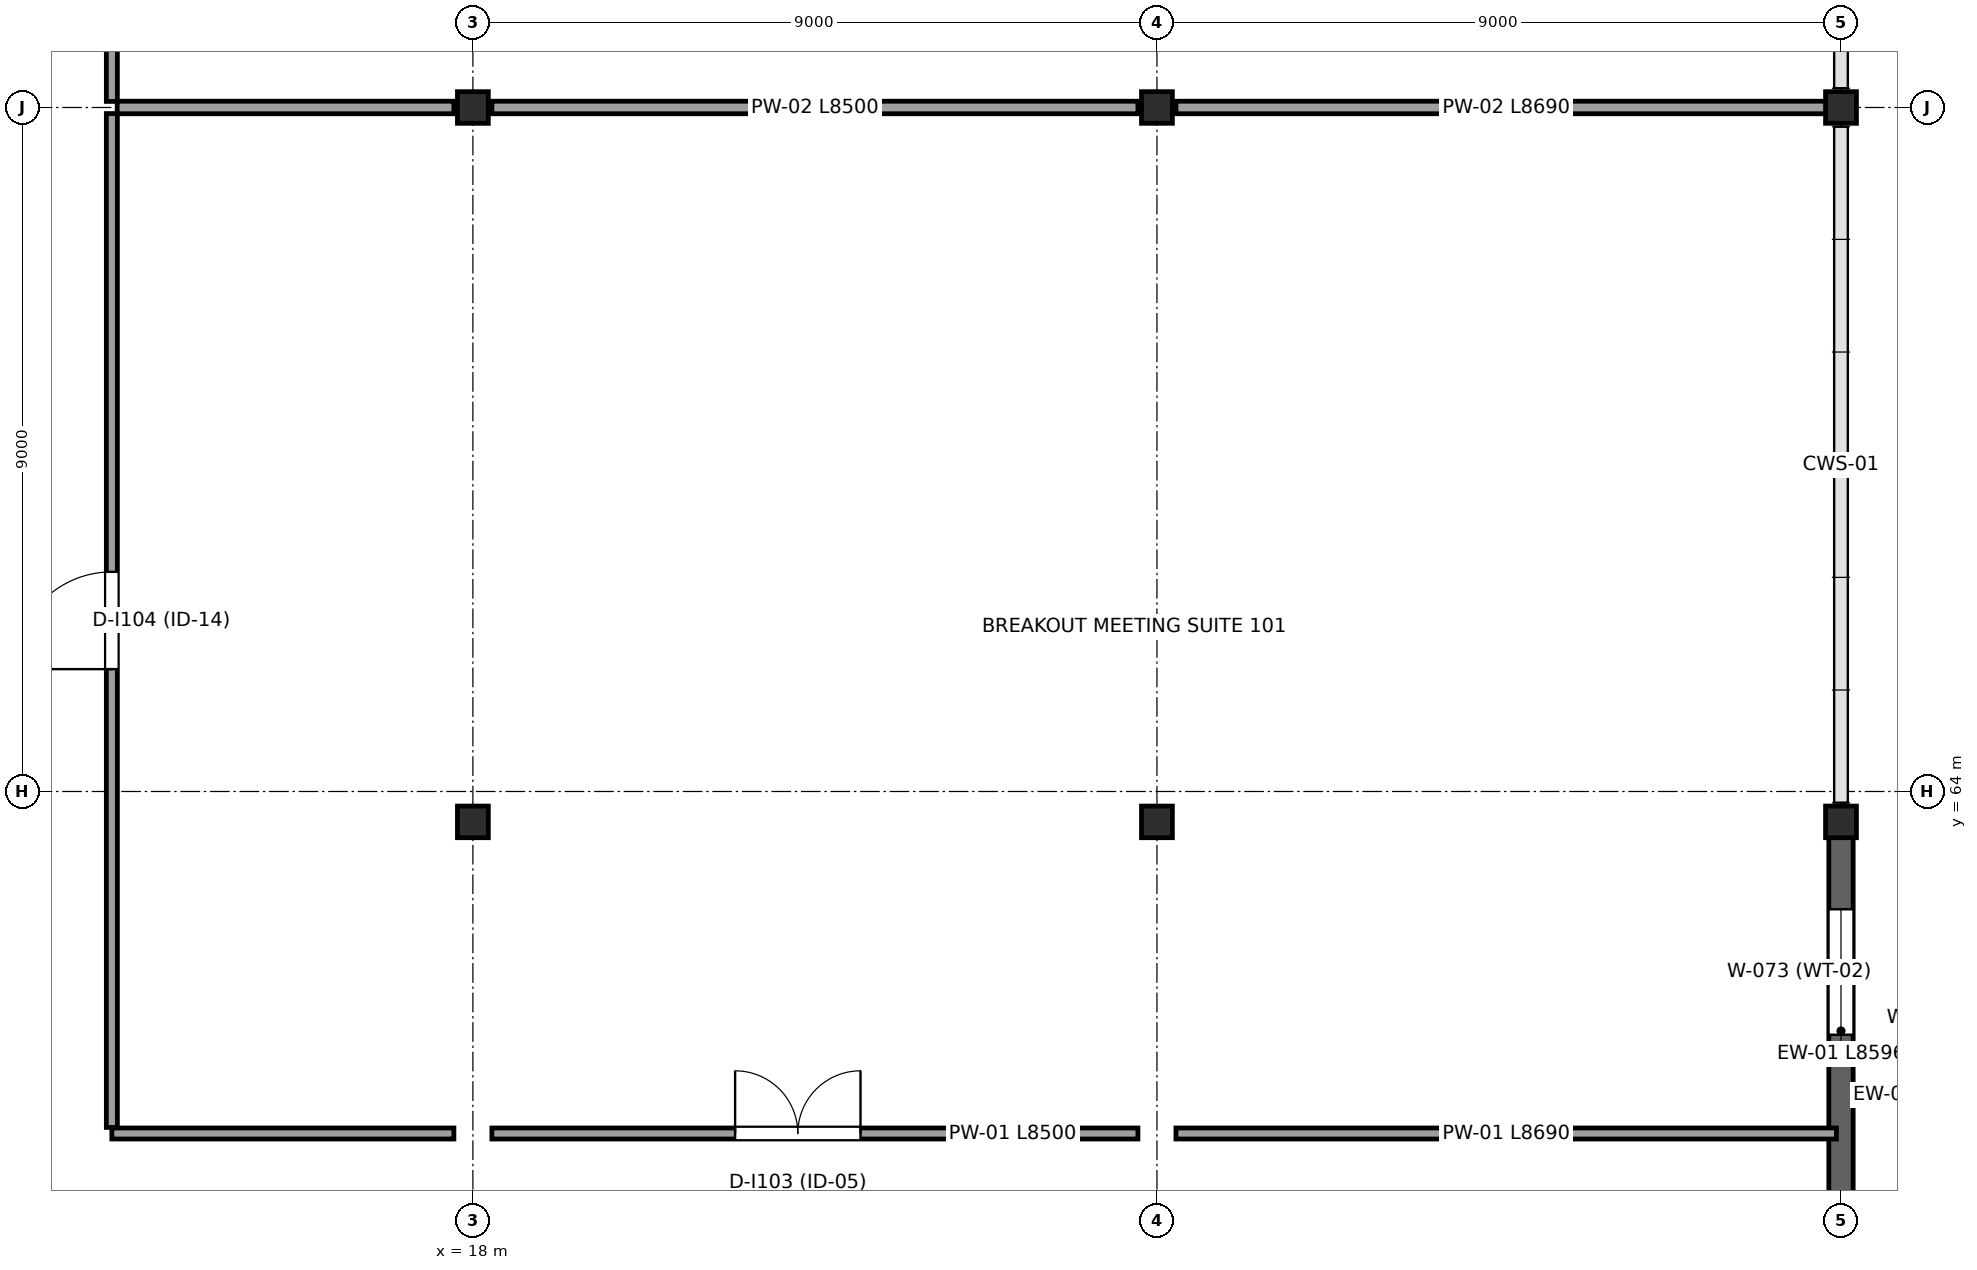
"""IFC4 building model, lengths in metres.
Left out: names, types, materials, properties, quantities, classifications, styles, units other than length and angle.
Written with IfcOpenShell. Run it as: python <this file> out.ifc"""

import sys

from ifc_helpers import new_model, si_unit, direction, frame, frame_2d, origin, origin_2d, place, context, subcontext, project, spatial, rectangle, i_section, extrude, element, fill, save


model = new_model("IFC4")
c1 = context("Model", 3, precision=1e-05, world=origin(), true_north=direction((0.0, 1.0)))
c2 = subcontext(c1, "Body", "Model", "MODEL_VIEW")
j1 = project(units=[si_unit("LENGTHUNIT", "METRE"), si_unit("PLANEANGLEUNIT", "RADIAN")], contexts=[c1])
p1 = place(None, origin())
s1 = spatial("IfcSite", under=j1, at=p1, CompositionType="ELEMENT")
p2 = place(p1, origin())
s2 = spatial("IfcBuilding", under=s1, at=p2, CompositionType="ELEMENT")
p3 = place(p2, frame((0.0, 0.0, 6.0)))
s3 = spatial("IfcBuildingStorey", under=s2, at=p3, CompositionType="ELEMENT", Elevation=6.0)
for number, where, z_axis, x_axis in (
    (1, (18.0, 63.6, 0.0), (0.0, 0.0, 1.0), (1.0, 0.0, 0.0)),
    (2, (18.0, 73.0, 0.0), (0.0, 0.0, 1.0), (1.0, 0.0, 0.0)),
    (3, (27.0, 63.6, 0.0), (0.0, 0.0, 1.0), (1.0, 0.0, 0.0)),
    (4, (27.0, 73.0, 0.0), (0.0, 0.0, 1.0), (1.0, 0.0, 0.0)),
    (5, (36.0, 63.6, 0.0), (0.0, 0.0, 1.0), (1.0, 0.0, 0.0)),
    (6, (36.0, 73.0, 0.0), (0.0, 0.0, 1.0), (1.0, 0.0, 0.0)),
):
    element("IfcColumn", number, at=place(p3, frame(where, z_axis=z_axis, x_axis=x_axis)), inside=s3, PredefinedType="COLUMN", context=c2, shape_type="SweptSolid", body=[
        extrude(i_section(OverallWidth=0.406, OverallDepth=0.416, WebThickness=0.03, FlangeThickness=0.048, at=origin_2d()), origin(), (0.0, 0.0, 1.0), 6.0),
    ])
p4 = place(p3, frame((36.0, 63.398, 0.0), z_axis=(0.0, 0.0, 1.0), x_axis=(0.0, -1.0, 0.0)))
e7 = element("IfcWall", 7, at=p4, inside=s3, PredefinedType="STANDARD", context=c2, shape_type="SweptSolid", body=[
    extrude(rectangle(XDim=8.596, YDim=0.32, at=frame_2d((4.298, 0.0))), origin(), (0.0, 0.0, 1.0), 5.78),
])
p5 = place(p4, frame((5.448, 0.0, 0.0)))
e8 = element("IfcOpeningElement", 8, at=p5, cuts=e7, PredefinedType="OPENING", context=c2, shape_type="SweptSolid", body=[
    extrude(rectangle(XDim=1.9, YDim=2.38, at=frame_2d((0.95, 1.19))), frame((0.0, 0.17, 0.0), z_axis=(0.0, -1.0, 0.0), x_axis=(1.0, 0.0, 0.0)), (0.0, 0.0, 1.0), 0.34),
])
p6 = place(p4, frame((0.948, 0.0, 1.1)))
e9 = element("IfcOpeningElement", 9, at=p6, cuts=e7, PredefinedType="OPENING", context=c2, shape_type="SweptSolid", body=[
    extrude(rectangle(XDim=1.65, YDim=1.8, at=frame_2d((0.825, 0.9))), frame((0.0, 0.17, 0.0), z_axis=(0.0, -1.0, 0.0), x_axis=(1.0, 0.0, 0.0)), (0.0, 0.0, 1.0), 0.34),
])
p7 = place(p3, frame((13.25, 59.5, 0.0), z_axis=(0.0, 0.0, 1.0), x_axis=(1.0, 0.0, 0.0)))
e10 = element("IfcWall", 10, at=p7, inside=s3, PredefinedType="PARTITIONING", context=c2, shape_type="SweptSolid", body=[
    extrude(rectangle(XDim=4.5, YDim=0.145, at=frame_2d((2.25, 0.0))), origin(), (0.0, 0.0, 1.0), 4.55),
])
p8 = place(p3, frame((18.25, 59.5, 0.0), z_axis=(0.0, 0.0, 1.0), x_axis=(1.0, 0.0, 0.0)))
e11 = element("IfcWall", 11, at=p8, inside=s3, PredefinedType="PARTITIONING", context=c2, shape_type="SweptSolid", body=[
    extrude(rectangle(XDim=8.5, YDim=0.145, at=frame_2d((4.25, 0.0))), origin(), (0.0, 0.0, 1.0), 4.55),
])
p9 = place(p8, frame((3.2, 0.0, 0.0)))
e12 = element("IfcOpeningElement", 12, at=p9, cuts=e11, PredefinedType="OPENING", context=c2, shape_type="SweptSolid", body=[
    extrude(rectangle(XDim=1.65, YDim=2.25, at=frame_2d((0.825, 1.125))), frame((0.0, 0.083, 0.0), z_axis=(0.0, -1.0, 0.0), x_axis=(1.0, 0.0, 0.0)), (0.0, 0.0, 1.0), 0.165),
])
p10 = place(p3, frame((27.25, 59.5, 0.0), z_axis=(0.0, 0.0, 1.0), x_axis=(1.0, 0.0, 0.0)))
e13 = element("IfcWall", 13, at=p10, inside=s3, PredefinedType="PARTITIONING", context=c2, shape_type="SweptSolid", body=[
    extrude(rectangle(XDim=8.69, YDim=0.145, at=frame_2d((4.345, 0.0))), origin(), (0.0, 0.0, 1.0), 4.55),
])
p11 = place(p3, frame((13.25, 59.58, 0.0), z_axis=(0.0, 0.0, 1.0), x_axis=(0.0, 1.0, 0.0)))
e14 = element("IfcWall", 14, at=p11, inside=s3, PredefinedType="PARTITIONING", context=c2, shape_type="SweptSolid", body=[
    extrude(rectangle(XDim=13.34, YDim=0.145, at=frame_2d((6.67, 0.0))), origin(), (0.0, 0.0, 1.0), 4.55),
])
p12 = place(p11, frame((6.03, 0.0, 0.0)))
e15 = element("IfcOpeningElement", 15, at=p12, cuts=e14, PredefinedType="OPENING", context=c2, shape_type="SweptSolid", body=[
    extrude(rectangle(XDim=1.28, YDim=2.34, at=frame_2d((0.64, 1.17))), frame((0.0, 0.083, 0.0), z_axis=(0.0, -1.0, 0.0), x_axis=(1.0, 0.0, 0.0)), (0.0, 0.0, 1.0), 0.165),
])
p13 = place(p3, frame((13.25, 73.08, 0.0), z_axis=(0.0, 0.0, 1.0), x_axis=(0.0, 1.0, 0.0)))
e16 = element("IfcWall", 16, at=p13, inside=s3, PredefinedType="PARTITIONING", context=c2, shape_type="SweptSolid", body=[
    extrude(rectangle(XDim=17.84, YDim=0.145, at=frame_2d((8.92, 0.0))), origin(), (0.0, 0.0, 1.0), 4.55),
])
p14 = place(p13, frame((8.095, 0.0, 0.0)))
e17 = element("IfcOpeningElement", 17, at=p14, cuts=e16, PredefinedType="OPENING", context=c2, shape_type="SweptSolid", body=[
    extrude(rectangle(XDim=1.65, YDim=2.25, at=frame_2d((0.825, 1.125))), frame((0.0, 0.083, 0.0), z_axis=(0.0, -1.0, 0.0), x_axis=(1.0, 0.0, 0.0)), (0.0, 0.0, 1.0), 0.165),
])
p15 = place(p3, frame((13.32, 73.0, 0.0), z_axis=(0.0, 0.0, 1.0), x_axis=(1.0, 0.0, 0.0)))
e18 = element("IfcWall", 18, at=p15, inside=s3, PredefinedType="PARTITIONING", context=c2, shape_type="SweptSolid", body=[
    extrude(rectangle(XDim=4.43, YDim=0.165, at=frame_2d((2.215, 0.0))), origin(), (0.0, 0.0, 1.0), 4.55),
])
p16 = place(p3, frame((18.25, 73.0, 0.0), z_axis=(0.0, 0.0, 1.0), x_axis=(1.0, 0.0, 0.0)))
e19 = element("IfcWall", 19, at=p16, inside=s3, PredefinedType="PARTITIONING", context=c2, shape_type="SweptSolid", body=[
    extrude(rectangle(XDim=8.5, YDim=0.165, at=frame_2d((4.25, 0.0))), origin(), (0.0, 0.0, 1.0), 4.55),
])
p17 = place(p3, frame((27.25, 73.0, 0.0), z_axis=(0.0, 0.0, 1.0), x_axis=(1.0, 0.0, 0.0)))
e20 = element("IfcWall", 20, at=p17, inside=s3, PredefinedType="PARTITIONING", context=c2, shape_type="SweptSolid", body=[
    extrude(rectangle(XDim=8.69, YDim=0.165, at=frame_2d((4.345, 0.0))), origin(), (0.0, 0.0, 1.0), 4.55),
])
p18 = place(p6, origin())
e21 = element("IfcWindow", 21, at=p18, inside=s3, PartitioningType="SINGLE_PANEL", PredefinedType="WINDOW", context=c2, shape_type="SweptSolid", body=[
    extrude(rectangle(XDim=1.65, YDim=1.8, at=frame_2d((0.825, 0.9))), frame((0.0, 0.03, 0.0), z_axis=(0.0, -1.0, 0.0), x_axis=(1.0, 0.0, 0.0)), (0.0, 0.0, 1.0), 0.06),
])
fill(e9, e21)
p19 = place(p9, origin())
e22 = element("IfcDoor", 22, at=p19, inside=s3, OperationType="DOUBLE_DOOR_SINGLE_SWING", PredefinedType="DOOR", context=c2, shape_type="SweptSolid", body=[
    extrude(rectangle(XDim=1.65, YDim=2.25, at=frame_2d((0.825, 1.125))), frame((0.0, 0.025, 0.0), z_axis=(0.0, -1.0, 0.0), x_axis=(1.0, 0.0, 0.0)), (0.0, 0.0, 1.0), 0.05),
])
fill(e12, e22)
p20 = place(p12, origin())
e23 = element("IfcDoor", 23, at=p20, inside=s3, OperationType="SINGLE_SWING_LEFT", PredefinedType="DOOR", context=c2, shape_type="SweptSolid", body=[
    extrude(rectangle(XDim=1.28, YDim=2.34, at=frame_2d((0.64, 1.17))), frame((0.0, 0.025, 0.0), z_axis=(0.0, -1.0, 0.0), x_axis=(1.0, 0.0, 0.0)), (0.0, 0.0, 1.0), 0.05),
])
fill(e15, e23)
save(model, sys.argv[1])
